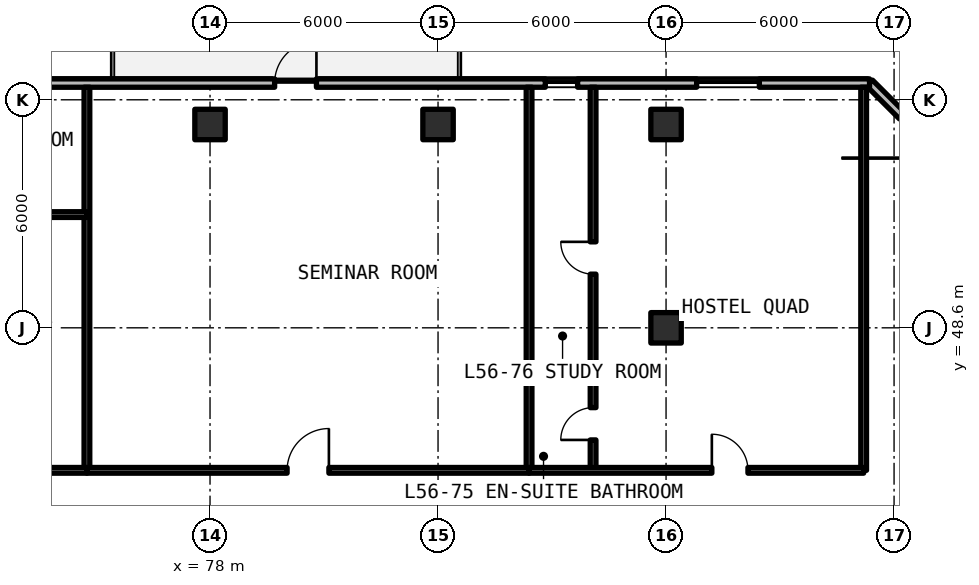
"""IFC4 building model, lengths in metres.
Left out: names, types, materials, properties, quantities, classifications, styles, units other than length and angle.
Written with IfcOpenShell. Run it as: python <this file> out.ifc"""

import sys

from ifc_helpers import new_model, si_unit, direction, frame, frame_2d, origin, origin_2d, place, context, subcontext, project, spatial, rectangle, extrude, element, fill, save


model = new_model("IFC4")
c1 = context("Model", 3, precision=1e-05, world=origin(), true_north=direction((0.0, 1.0)))
c2 = subcontext(c1, "Body", "Model", "MODEL_VIEW")
j1 = project(units=[si_unit("LENGTHUNIT", "METRE"), si_unit("PLANEANGLEUNIT", "RADIAN")], contexts=[c1])
p1 = place(None, origin())
s1 = spatial("IfcSite", under=j1, at=p1, CompositionType="ELEMENT")
p2 = place(p1, origin())
s2 = spatial("IfcBuilding", under=s1, at=p2, CompositionType="ELEMENT")
p3 = place(p2, frame((0.0, 0.0, 201.63)))
s3 = spatial("IfcBuildingStorey", under=s2, at=p3, CompositionType="ELEMENT", Elevation=201.63)
for number, where, z_axis, x_axis in (
    (1, (90.0, 48.6, 0.0), (0.0, 0.0, 1.0), (1.0, 0.0, 0.0)),
    (2, (78.0, 53.95, 0.0), (0.0, 0.0, 1.0), (1.0, 0.0, 0.0)),
    (3, (84.0, 53.95, 0.0), (0.0, 0.0, 1.0), (1.0, 0.0, 0.0)),
    (4, (90.0, 53.95, 0.0), (0.0, 0.0, 1.0), (1.0, 0.0, 0.0)),
):
    element("IfcColumn", number, at=place(p3, frame(where, z_axis=z_axis, x_axis=x_axis)), inside=s3, PredefinedType="COLUMN", context=c2, shape_type="SweptSolid", body=[
        extrude(rectangle(XDim=0.8, YDim=0.8, at=origin_2d()), origin(), (0.0, 0.0, 1.0), 3.3),
    ])
p4 = place(p3, frame((99.49, 50.904, 0.0), z_axis=(0.0, 0.0, 1.0), x_axis=(-0.707085909342, 0.707127652415, 0.0)))
e5 = element("IfcWall", 5, at=p4, inside=s3, PredefinedType="SOLIDWALL", context=c2, shape_type="SweptSolid", body=[
    extrude(rectangle(XDim=5.849, YDim=0.22, at=frame_2d((2.924, 0.0))), origin(), (0.0, 0.0, 1.0), 3.08),
])
p5 = place(p4, frame((1.224, 0.0, 0.78)))
e6 = element("IfcOpeningElement", 6, at=p5, cuts=e5, PredefinedType="OPENING", context=c2, shape_type="SweptSolid", body=[
    extrude(rectangle(XDim=3.4, YDim=1.66, at=frame_2d((1.7, 0.83))), frame((0.0, 0.12, 0.0), z_axis=(0.0, -1.0, 0.0), x_axis=(1.0, 0.0, 0.0)), (0.0, 0.0, 1.0), 0.24),
])
p6 = place(p3, frame((95.354, 55.04, 0.0), z_axis=(0.0, 0.0, 1.0), x_axis=(-1.0, 0.0, 0.0)))
e7 = element("IfcWall", 7, at=p6, inside=s3, PredefinedType="SOLIDWALL", context=c2, shape_type="SweptSolid", body=[
    extrude(rectangle(XDim=43.244, YDim=0.22, at=frame_2d((21.622, 0.0))), origin(), (0.0, 0.0, 1.0), 3.08),
])
p7 = place(p6, frame((26.404, 0.0, 0.0)))
e8 = element("IfcOpeningElement", 8, at=p7, cuts=e7, PredefinedType="OPENING", context=c2, shape_type="SweptSolid", body=[
    extrude(rectangle(XDim=1.1, YDim=2.15, at=frame_2d((0.55, 1.075))), frame((0.0, 0.12, 0.0), z_axis=(0.0, -1.0, 0.0), x_axis=(1.0, 0.0, 0.0)), (0.0, 0.0, 1.0), 0.24),
])
p8 = place(p6, frame((14.554, 0.0, 0.0)))
e9 = element("IfcOpeningElement", 9, at=p8, cuts=e7, PredefinedType="OPENING", context=c2, shape_type="SweptSolid", body=[
    extrude(rectangle(XDim=1.1, YDim=2.15, at=frame_2d((0.55, 1.075))), frame((0.0, 0.12, 0.0), z_axis=(0.0, -1.0, 0.0), x_axis=(1.0, 0.0, 0.0)), (0.0, 0.0, 1.0), 0.24),
])
p9 = place(p6, frame((38.802, 0.0, 0.78)))
e10 = element("IfcOpeningElement", 10, at=p9, cuts=e7, PredefinedType="OPENING", context=c2, shape_type="SweptSolid", body=[
    extrude(rectangle(XDim=1.65, YDim=1.66, at=frame_2d((0.825, 0.83))), frame((0.0, 0.12, 0.0), z_axis=(0.0, -1.0, 0.0), x_axis=(1.0, 0.0, 0.0)), (0.0, 0.0, 1.0), 0.24),
])
p10 = place(p6, frame((31.904, 0.0, 0.78)))
e11 = element("IfcOpeningElement", 11, at=p10, cuts=e7, PredefinedType="OPENING", context=c2, shape_type="SweptSolid", body=[
    extrude(rectangle(XDim=1.65, YDim=1.66, at=frame_2d((0.825, 0.83))), frame((0.0, 0.12, 0.0), z_axis=(0.0, -1.0, 0.0), x_axis=(1.0, 0.0, 0.0)), (0.0, 0.0, 1.0), 0.24),
])
p11 = place(p6, frame((7.682, 0.0, 0.78)))
e12 = element("IfcOpeningElement", 12, at=p11, cuts=e7, PredefinedType="OPENING", context=c2, shape_type="SweptSolid", body=[
    extrude(rectangle(XDim=0.85, YDim=1.65, at=frame_2d((0.425, 0.825))), frame((0.0, 0.12, 0.0), z_axis=(0.0, -1.0, 0.0), x_axis=(1.0, 0.0, 0.0)), (0.0, 0.0, 1.0), 0.24),
])
p12 = place(p6, frame((2.899, 0.0, 0.78)))
e13 = element("IfcOpeningElement", 13, at=p12, cuts=e7, PredefinedType="OPENING", context=c2, shape_type="SweptSolid", body=[
    extrude(rectangle(XDim=1.65, YDim=1.66, at=frame_2d((0.825, 0.83))), frame((0.0, 0.12, 0.0), z_axis=(0.0, -1.0, 0.0), x_axis=(1.0, 0.0, 0.0)), (0.0, 0.0, 1.0), 0.24),
])
for number, where, z_axis, x_axis in (
    (14, (95.2, 44.85, 0.0), (0.0, 0.0, 1.0), (0.0, 1.0, 0.0)),
    (15, (74.76, 44.85, 0.0), (0.0, 0.0, 1.0), (0.0, 1.0, 0.0)),
):
    element("IfcWall", number, at=place(p3, frame(where, z_axis=z_axis, x_axis=x_axis)), inside=s3, PredefinedType="SOLIDWALL", context=c2, shape_type="SweptSolid", body=[
        extrude(rectangle(XDim=10.08, YDim=0.15, at=frame_2d((5.04, 0.0))), origin(), (0.0, 0.0, 1.0), 2.35),
    ])
p13 = place(p3, frame((65.956, 51.58, 0.0), z_axis=(0.0, 0.0, 1.0), x_axis=(1.0, 0.0, 0.0)))
e16 = element("IfcWall", 16, at=p13, inside=s3, PredefinedType="PARTITIONING", context=c2, shape_type="SweptSolid", body=[
    extrude(rectangle(XDim=8.805, YDim=0.15, at=frame_2d((4.402, 0.0))), origin(), (0.0, 0.0, 1.0), 2.35),
])
p14 = place(p13, frame((5.192, 0.0, 0.0)))
e17 = element("IfcOpeningElement", 17, at=p14, cuts=e16, PredefinedType="OPENING", context=c2, shape_type="SweptSolid", body=[
    extrude(rectangle(XDim=0.85, YDim=2.1, at=frame_2d((0.425, 1.05))), frame((0.0, 0.085, 0.0), z_axis=(0.0, -1.0, 0.0), x_axis=(1.0, 0.0, 0.0)), (0.0, 0.0, 1.0), 0.17),
])
p15 = place(p3, frame((65.956, 44.85, 0.0), z_axis=(0.0, 0.0, 1.0), x_axis=(1.0, 0.0, 0.0)))
e18 = element("IfcWall", 18, at=p15, inside=s3, PredefinedType="SOLIDWALL", context=c2, shape_type="SweptSolid", body=[
    extrude(rectangle(XDim=8.805, YDim=0.15, at=frame_2d((4.402, 0.0))), origin(), (0.0, 0.0, 1.0), 2.35),
])
p16 = place(p15, frame((5.142, 0.0, 0.0)))
e19 = element("IfcOpeningElement", 19, at=p16, cuts=e18, PredefinedType="OPENING", context=c2, shape_type="SweptSolid", body=[
    extrude(rectangle(XDim=0.95, YDim=2.15, at=frame_2d((0.475, 1.075))), frame((0.0, 0.085, 0.0), z_axis=(0.0, -1.0, 0.0), x_axis=(1.0, 0.0, 0.0)), (0.0, 0.0, 1.0), 0.17),
])
p17 = place(p3, frame((86.395, 44.85, 0.0), z_axis=(0.0, 0.0, 1.0), x_axis=(0.0, 1.0, 0.0)))
e20 = element("IfcWall", 20, at=p17, inside=s3, PredefinedType="SOLIDWALL", context=c2, shape_type="SweptSolid", body=[
    extrude(rectangle(XDim=10.08, YDim=0.15, at=frame_2d((5.04, 0.0))), origin(), (0.0, 0.0, 1.0), 2.35),
])
p18 = place(p3, frame((74.76, 44.85, 0.0), z_axis=(0.0, 0.0, 1.0), x_axis=(1.0, 0.0, 0.0)))
e21 = element("IfcWall", 21, at=p18, inside=s3, PredefinedType="SOLIDWALL", context=c2, shape_type="SweptSolid", body=[
    extrude(rectangle(XDim=11.635, YDim=0.15, at=frame_2d((5.817, 0.0))), origin(), (0.0, 0.0, 1.0), 2.35),
])
p19 = place(p18, frame((5.267, 0.0, 0.0)))
e22 = element("IfcOpeningElement", 22, at=p19, cuts=e21, PredefinedType="OPENING", context=c2, shape_type="SweptSolid", body=[
    extrude(rectangle(XDim=1.1, YDim=2.15, at=frame_2d((0.55, 1.075))), frame((0.0, 0.085, 0.0), z_axis=(0.0, -1.0, 0.0), x_axis=(1.0, 0.0, 0.0)), (0.0, 0.0, 1.0), 0.17),
])
p20 = place(p3, frame((86.395, 47.3, 0.0), z_axis=(0.0, 0.0, 1.0), x_axis=(1.0, 0.0, 0.0)))
e23 = element("IfcWall", 23, at=p20, inside=s3, PredefinedType="PARTITIONING", context=c2, shape_type="SweptSolid", body=[
    extrude(rectangle(XDim=1.685, YDim=0.15, at=frame_2d((0.842, 0.0))), origin(), (0.0, 0.0, 1.0), 2.35),
])
p21 = place(p3, frame((88.08, 44.85, 0.0), z_axis=(0.0, 0.0, 1.0), x_axis=(0.0, 1.0, 0.0)))
e24 = element("IfcWall", 24, at=p21, inside=s3, PredefinedType="PARTITIONING", context=c2, shape_type="SweptSolid", body=[
    extrude(rectangle(XDim=10.08, YDim=0.15, at=frame_2d((5.04, 0.0))), origin(), (0.0, 0.0, 1.0), 2.35),
])
p22 = place(p21, frame((0.8, 0.0, 0.0)))
e25 = element("IfcOpeningElement", 25, at=p22, cuts=e24, PredefinedType="OPENING", context=c2, shape_type="SweptSolid", body=[
    extrude(rectangle(XDim=0.85, YDim=2.1, at=frame_2d((0.425, 1.05))), frame((0.0, 0.085, 0.0), z_axis=(0.0, -1.0, 0.0), x_axis=(1.0, 0.0, 0.0)), (0.0, 0.0, 1.0), 0.17),
])
p23 = place(p21, frame((5.162, 0.0, 0.0)))
e26 = element("IfcOpeningElement", 26, at=p23, cuts=e24, PredefinedType="OPENING", context=c2, shape_type="SweptSolid", body=[
    extrude(rectangle(XDim=0.85, YDim=2.1, at=frame_2d((0.425, 1.05))), frame((0.0, 0.085, 0.0), z_axis=(0.0, -1.0, 0.0), x_axis=(1.0, 0.0, 0.0)), (0.0, 0.0, 1.0), 0.17),
])
p24 = place(p3, frame((86.395, 44.85, 0.0), z_axis=(0.0, 0.0, 1.0), x_axis=(1.0, 0.0, 0.0)))
e27 = element("IfcWall", 27, at=p24, inside=s3, PredefinedType="SOLIDWALL", context=c2, shape_type="SweptSolid", body=[
    extrude(rectangle(XDim=8.805, YDim=0.15, at=frame_2d((4.402, 0.0))), origin(), (0.0, 0.0, 1.0), 2.35),
])
p25 = place(p24, frame((4.81, 0.0, 0.0)))
e28 = element("IfcOpeningElement", 28, at=p25, cuts=e27, PredefinedType="OPENING", context=c2, shape_type="SweptSolid", body=[
    extrude(rectangle(XDim=0.95, YDim=2.15, at=frame_2d((0.475, 1.075))), frame((0.0, 0.085, 0.0), z_axis=(0.0, -1.0, 0.0), x_axis=(1.0, 0.0, 0.0)), (0.0, 0.0, 1.0), 0.17),
])
p26 = place(p8, frame((1.1, 0.0, 0.0), z_axis=(0.0, 0.0, 1.0), x_axis=(-1.0, 0.0, 0.0)))
e29 = element("IfcDoor", 29, at=p26, inside=s3, OperationType="SINGLE_SWING_LEFT", PredefinedType="DOOR", context=c2, shape_type="SweptSolid", body=[
    extrude(rectangle(XDim=1.1, YDim=2.15, at=frame_2d((0.55, 1.075))), frame((0.0, 0.025, 0.0), z_axis=(0.0, -1.0, 0.0), x_axis=(1.0, 0.0, 0.0)), (0.0, 0.0, 1.0), 0.05),
])
fill(e9, e29)
p27 = place(p11, origin())
e30 = element("IfcWindow", 30, at=p27, inside=s3, PartitioningType="SINGLE_PANEL", PredefinedType="WINDOW", context=c2, shape_type="SweptSolid", body=[
    extrude(rectangle(XDim=0.85, YDim=1.65, at=frame_2d((0.425, 0.825))), frame((0.0, 0.03, 0.0), z_axis=(0.0, -1.0, 0.0), x_axis=(1.0, 0.0, 0.0)), (0.0, 0.0, 1.0), 0.06),
])
fill(e12, e30)
p28 = place(p12, origin())
e31 = element("IfcWindow", 31, at=p28, inside=s3, PartitioningType="SINGLE_PANEL", PredefinedType="WINDOW", context=c2, shape_type="SweptSolid", body=[
    extrude(rectangle(XDim=1.65, YDim=1.66, at=frame_2d((0.825, 0.83))), frame((0.0, 0.03, 0.0), z_axis=(0.0, -1.0, 0.0), x_axis=(1.0, 0.0, 0.0)), (0.0, 0.0, 1.0), 0.06),
])
fill(e13, e31)
p29 = place(p19, origin())
e32 = element("IfcDoor", 32, at=p29, inside=s3, OperationType="SINGLE_SWING_RIGHT", PredefinedType="DOOR", context=c2, shape_type="SweptSolid", body=[
    extrude(rectangle(XDim=1.1, YDim=2.15, at=frame_2d((0.55, 1.075))), frame((0.0, 0.025, 0.0), z_axis=(0.0, -1.0, 0.0), x_axis=(1.0, 0.0, 0.0)), (0.0, 0.0, 1.0), 0.05),
])
fill(e22, e32)
p30 = place(p22, origin())
e33 = element("IfcDoor", 33, at=p30, inside=s3, OperationType="SINGLE_SWING_LEFT", PredefinedType="DOOR", context=c2, shape_type="SweptSolid", body=[
    extrude(rectangle(XDim=0.85, YDim=2.1, at=frame_2d((0.425, 1.05))), frame((0.0, 0.025, 0.0), z_axis=(0.0, -1.0, 0.0), x_axis=(1.0, 0.0, 0.0)), (0.0, 0.0, 1.0), 0.05),
])
fill(e25, e33)
p31 = place(p23, origin())
e34 = element("IfcDoor", 34, at=p31, inside=s3, OperationType="SINGLE_SWING_RIGHT", PredefinedType="DOOR", context=c2, shape_type="SweptSolid", body=[
    extrude(rectangle(XDim=0.85, YDim=2.1, at=frame_2d((0.425, 1.05))), frame((0.0, 0.025, 0.0), z_axis=(0.0, -1.0, 0.0), x_axis=(1.0, 0.0, 0.0)), (0.0, 0.0, 1.0), 0.05),
])
fill(e26, e34)
p32 = place(p25, origin())
e35 = element("IfcDoor", 35, at=p32, inside=s3, OperationType="SINGLE_SWING_LEFT", PredefinedType="DOOR", context=c2, shape_type="SweptSolid", body=[
    extrude(rectangle(XDim=0.95, YDim=2.15, at=frame_2d((0.475, 1.075))), frame((0.0, 0.025, 0.0), z_axis=(0.0, -1.0, 0.0), x_axis=(1.0, 0.0, 0.0)), (0.0, 0.0, 1.0), 0.05),
])
fill(e28, e35)
save(model, sys.argv[1])
